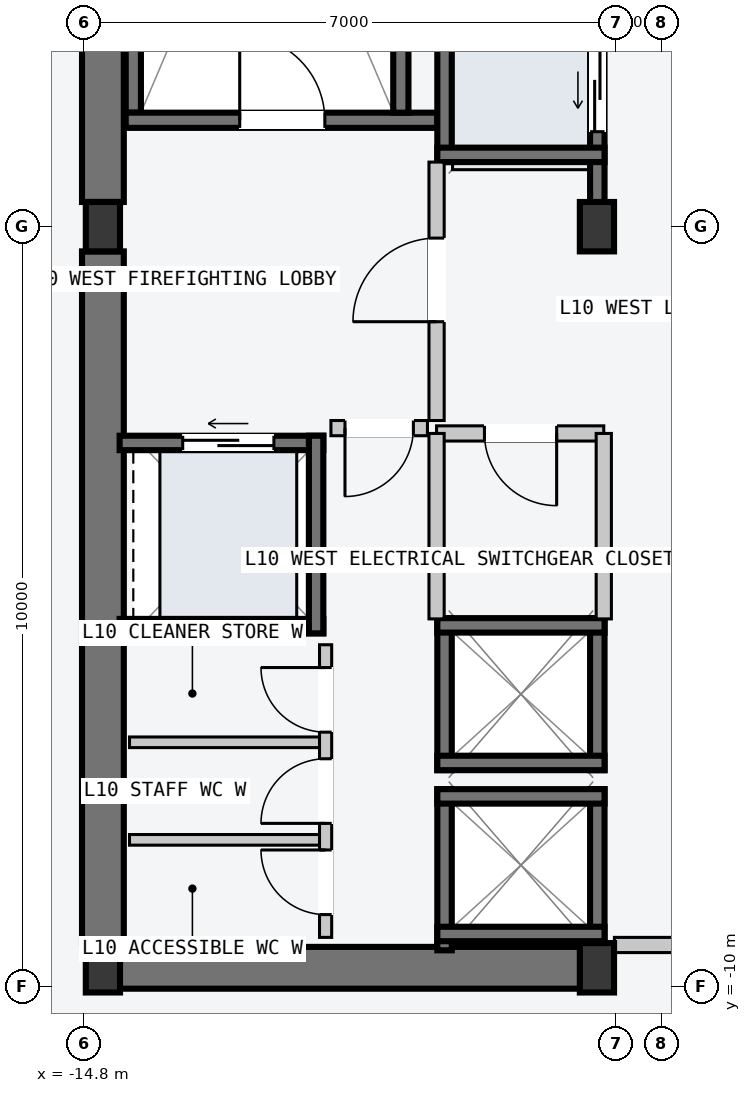
"""IFC4 building model, lengths in metres.
Left out: names, types, materials, properties, quantities, classifications, styles, units other than length and angle.
Written with IfcOpenShell. Run it as: python <this file> out.ifc"""

import sys

from ifc_helpers import new_model, si_unit, direction, frame, frame_2d, origin, origin_2d, place, context, subcontext, project, spatial, rectangle, i_section, extrude, element, fill, save


model = new_model("IFC4")
c1 = context("Model", 3, precision=1e-05, world=origin(), true_north=direction((0.0, 1.0)))
c2 = subcontext(c1, "Body", "Model", "MODEL_VIEW")
j1 = project(units=[si_unit("LENGTHUNIT", "METRE"), si_unit("PLANEANGLEUNIT", "RADIAN")], contexts=[c1])
p1 = place(None, origin())
s1 = spatial("IfcSite", under=j1, at=p1, CompositionType="ELEMENT")
p2 = place(p1, origin())
s2 = spatial("IfcBuilding", under=s1, at=p2, CompositionType="ELEMENT")
p3 = place(p2, frame((0.0, 0.0, 42.0)))
s3 = spatial("IfcBuildingStorey", under=s2, at=p3, CompositionType="ELEMENT", Elevation=42.0)
p4 = place(p3, frame((-14.53, -9.75, -0.2), z_axis=(0.0, 0.0, 1.0), x_axis=(1.0, 0.0, 0.0)))
e1 = element("IfcWall", 1, at=p4, inside=s3, PredefinedType="SHEAR", context=c2, shape_type="SweptSolid", body=[
    extrude(rectangle(XDim=6.46, YDim=0.55, at=frame_2d((3.23, 0.0))), origin(), (0.0, 0.0, 1.0), 3.6),
])
for number, where, z_axis, x_axis in (
    (2, (-14.55, -9.425, -0.2), (0.0, 0.0, 1.0), (0.0, 1.0, 0.0)),
    (3, (-14.55, 0.325, -0.2), (0.0, 0.0, 1.0), (0.0, 1.0, 0.0)),
):
    element("IfcWall", number, at=place(p3, frame(where, z_axis=z_axis, x_axis=x_axis)), inside=s3, PredefinedType="SHEAR", context=c2, shape_type="SweptSolid", body=[
        extrude(rectangle(XDim=9.1, YDim=0.55, at=frame_2d((4.55, 0.0))), origin(), (0.0, 0.0, 1.0), 3.6),
    ])
p5 = place(p3, frame((-14.15, 1.5, -0.2), z_axis=(0.0, 0.0, 1.0), x_axis=(0.0, 1.0, 0.0)))
e4 = element("IfcWall", 4, at=p5, inside=s3, PredefinedType="SOLIDWALL", context=c2, shape_type="SweptSolid", body=[
    extrude(rectangle(XDim=7.8, YDim=0.2, at=frame_2d((3.9, 0.0))), origin(), (0.0, 0.0, 1.0), 3.6),
])
p6 = place(p3, frame((-14.25, 1.4, -0.2), z_axis=(0.0, 0.0, 1.0), x_axis=(1.0, 0.0, 0.0)))
e5 = element("IfcWall", 5, at=p6, inside=s3, PredefinedType="SOLIDWALL", context=c2, shape_type="SweptSolid", body=[
    extrude(rectangle(XDim=4.1, YDim=0.2, at=frame_2d((2.05, 0.0))), origin(), (0.0, 0.0, 1.0), 3.6),
])
p7 = place(p6, frame((1.5, 0.0, 0.2)))
e6 = element("IfcOpeningElement", 6, at=p7, cuts=e5, PredefinedType="OPENING", context=c2, shape_type="SweptSolid", body=[
    extrude(rectangle(XDim=1.12, YDim=2.18, at=frame_2d((0.56, 1.09))), frame((0.0, 0.11, 0.0), z_axis=(0.0, -1.0, 0.0), x_axis=(1.0, 0.0, 0.0)), (0.0, 0.0, 1.0), 0.22),
])
p8 = place(p3, frame((-10.63, 1.5, -0.2), z_axis=(0.0, 0.0, 1.0), x_axis=(0.0, 1.0, 0.0)))
e7 = element("IfcWall", 7, at=p8, inside=s3, PredefinedType="SOLIDWALL", context=c2, shape_type="SweptSolid", body=[
    extrude(rectangle(XDim=7.8, YDim=0.2, at=frame_2d((3.9, 0.0))), origin(), (0.0, 0.0, 1.0), 3.6),
])
for number, where, z_axis, x_axis in (
    (8, (-14.55, -9.75, 0.0), (0.0, 0.0, 1.0), (1.0, 0.0, 0.0)),
    (9, (-14.55, 0.0, 0.0), (0.0, 0.0, 1.0), (1.0, 0.0, 0.0)),
    (10, (-8.05, -9.75, 0.0), (0.0, 0.0, 1.0), (1.0, 0.0, 0.0)),
    (11, (-8.05, 0.0, 0.0), (0.0, 0.0, 1.0), (1.0, 0.0, 0.0)),
):
    element("IfcColumn", number, at=place(p3, frame(where, z_axis=z_axis, x_axis=x_axis)), inside=s3, PredefinedType="COLUMN", context=c2, shape_type="SweptSolid", body=[
        extrude(i_section(OverallWidth=0.45, OverallDepth=0.65, WebThickness=0.025, FlangeThickness=0.04, at=origin_2d()), origin(), (0.0, 0.0, 1.0), 3.6),
    ])
p9 = place(p3, frame((-8.045, 0.21, -0.2), z_axis=(0.0, 0.0, 1.0), x_axis=(0.0, 1.0, 0.0)))
e12 = element("IfcWall", 12, at=p9, inside=s3, PredefinedType="SOLIDWALL", context=c2, shape_type="SweptSolid", body=[
    extrude(rectangle(XDim=2.54, YDim=0.19, at=frame_2d((1.27, 0.0))), origin(), (0.0, 0.0, 1.0), 3.6),
])
p10 = place(p9, frame((1.04, 0.0, 0.2)))
e13 = element("IfcOpeningElement", 13, at=p10, cuts=e12, PredefinedType="OPENING", context=c2, shape_type="SweptSolid", body=[
    extrude(rectangle(XDim=1.1, YDim=2.2, at=frame_2d((0.55, 1.1))), frame((0.0, 0.105, 0.0), z_axis=(0.0, -1.0, 0.0), x_axis=(1.0, 0.0, 0.0)), (0.0, 0.0, 1.0), 0.21),
])
p11 = place(p3, frame((-10.055, 0.85, -0.2), z_axis=(0.0, 0.0, 1.0), x_axis=(0.0, 1.0, 0.0)))
e14 = element("IfcWall", 14, at=p11, inside=s3, PredefinedType="SOLIDWALL", context=c2, shape_type="SweptSolid", body=[
    extrude(rectangle(XDim=1.9, YDim=0.19, at=frame_2d((0.95, 0.0))), origin(), (0.0, 0.0, 1.0), 3.6),
])
p12 = place(p3, frame((-10.15, 0.945, -0.2), z_axis=(0.0, 0.0, 1.0), x_axis=(1.0, 0.0, 0.0)))
e15 = element("IfcWall", 15, at=p12, inside=s3, PredefinedType="SOLIDWALL", context=c2, shape_type="SweptSolid", body=[
    extrude(rectangle(XDim=2.2, YDim=0.19, at=frame_2d((1.1, 0.0))), origin(), (0.0, 0.0, 1.0), 3.6),
])
for number, where, z_axis, x_axis in (
    (16, (-8.045, -9.52, -0.2), (0.0, 0.0, 1.0), (0.0, 1.0, 0.0)),
    (17, (-10.055, -9.52, -0.2), (0.0, 0.0, 1.0), (0.0, 1.0, 0.0)),
):
    element("IfcWall", number, at=place(p3, frame(where, z_axis=z_axis, x_axis=x_axis)), inside=s3, PredefinedType="SOLIDWALL", context=c2, shape_type="SweptSolid", body=[
        extrude(rectangle(XDim=2.12, YDim=0.19, at=frame_2d((1.06, 0.0))), origin(), (0.0, 0.0, 1.0), 3.6),
    ])
for number, where, z_axis, x_axis in (
    (18, (-10.15, -7.495, -0.2), (0.0, 0.0, 1.0), (1.0, 0.0, 0.0)),
    (19, (-10.15, -9.305, -0.2), (0.0, 0.0, 1.0), (1.0, 0.0, 0.0)),
):
    element("IfcWall", number, at=place(p3, frame(where, z_axis=z_axis, x_axis=x_axis)), inside=s3, PredefinedType="SOLIDWALL", context=c2, shape_type="SweptSolid", body=[
        extrude(rectangle(XDim=2.2, YDim=0.19, at=frame_2d((1.1, 0.0))), origin(), (0.0, 0.0, 1.0), 3.6),
    ])
for number, where, z_axis, x_axis in (
    (20, (-8.045, -7.15, -0.2), (0.0, 0.0, 1.0), (0.0, 1.0, 0.0)),
    (21, (-10.055, -7.15, -0.2), (0.0, 0.0, 1.0), (0.0, 1.0, 0.0)),
):
    element("IfcWall", number, at=place(p3, frame(where, z_axis=z_axis, x_axis=x_axis)), inside=s3, PredefinedType="SOLIDWALL", context=c2, shape_type="SweptSolid", body=[
        extrude(rectangle(XDim=2.0, YDim=0.19, at=frame_2d((1.0, 0.0))), origin(), (0.0, 0.0, 1.0), 3.6),
    ])
for number, where, z_axis, x_axis in (
    (22, (-10.15, -5.245, -0.2), (0.0, 0.0, 1.0), (1.0, 0.0, 0.0)),
    (23, (-10.15, -7.055, -0.2), (0.0, 0.0, 1.0), (1.0, 0.0, 0.0)),
):
    element("IfcWall", number, at=place(p3, frame(where, z_axis=z_axis, x_axis=x_axis)), inside=s3, PredefinedType="SOLIDWALL", context=c2, shape_type="SweptSolid", body=[
        extrude(rectangle(XDim=2.2, YDim=0.19, at=frame_2d((1.1, 0.0))), origin(), (0.0, 0.0, 1.0), 3.6),
    ])
p13 = place(p3, frame((-14.33, -2.845, -0.2), z_axis=(0.0, 0.0, 1.0), x_axis=(1.0, 0.0, 0.0)))
e24 = element("IfcWall", 24, at=p13, inside=s3, PredefinedType="SOLIDWALL", context=c2, shape_type="SweptSolid", body=[
    extrude(rectangle(XDim=2.68, YDim=0.19, at=frame_2d((1.34, 0.0))), origin(), (0.0, 0.0, 1.0), 3.6),
])
p14 = place(p13, frame((0.83, 0.0, 0.2)))
e25 = element("IfcOpeningElement", 25, at=p14, cuts=e24, PredefinedType="OPENING", context=c2, shape_type="SweptSolid", body=[
    extrude(rectangle(XDim=1.2, YDim=2.2, at=frame_2d((0.6, 1.1))), frame((0.0, 0.105, 0.0), z_axis=(0.0, -1.0, 0.0), x_axis=(1.0, 0.0, 0.0)), (0.0, 0.0, 1.0), 0.21),
])
p15 = place(p3, frame((-14.33, -5.255, -0.2), z_axis=(0.0, 0.0, 1.0), x_axis=(1.0, 0.0, 0.0)))
e26 = element("IfcWall", 26, at=p15, inside=s3, PredefinedType="SOLIDWALL", context=c2, shape_type="SweptSolid", body=[
    extrude(rectangle(XDim=2.68, YDim=0.19, at=frame_2d((1.34, 0.0))), origin(), (0.0, 0.0, 1.0), 3.6),
])
p16 = place(p3, frame((-11.745, -5.35, -0.2), z_axis=(0.0, 0.0, 1.0), x_axis=(0.0, 1.0, 0.0)))
e27 = element("IfcWall", 27, at=p16, inside=s3, PredefinedType="SOLIDWALL", context=c2, shape_type="SweptSolid", body=[
    extrude(rectangle(XDim=2.6, YDim=0.19, at=frame_2d((1.3, 0.0))), origin(), (0.0, 0.0, 1.0), 3.6),
])
p17 = place(p3, frame((-6.02, -9.45, 0.0), z_axis=(0.0, 0.0, 1.0), x_axis=(-1.0, 0.0, 0.0)))
e28 = element("IfcWall", 28, at=p17, inside=s3, PredefinedType="PARTITIONING", context=c2, shape_type="SweptSolid", body=[
    extrude(rectangle(XDim=1.8, YDim=0.2, at=frame_2d((0.9, 0.0))), origin(), (0.0, 0.0, 1.0), 3.4),
])
p18 = place(p3, frame((-10.16, -2.55, 0.0), z_axis=(0.0, 0.0, 1.0), x_axis=(0.0, 1.0, 0.0)))
e29 = element("IfcWall", 29, at=p18, inside=s3, PredefinedType="PARTITIONING", context=c2, shape_type="SweptSolid", body=[
    extrude(rectangle(XDim=3.4, YDim=0.2, at=frame_2d((1.7, 0.0))), origin(), (0.0, 0.0, 1.0), 3.4),
])
p19 = place(p18, frame((1.3, 0.0, 0.0)))
e30 = element("IfcOpeningElement", 30, at=p19, cuts=e29, PredefinedType="OPENING", context=c2, shape_type="SweptSolid", body=[
    extrude(rectangle(XDim=1.1, YDim=2.15, at=frame_2d((0.55, 1.075))), frame((0.0, 0.11, 0.0), z_axis=(0.0, -1.0, 0.0), x_axis=(1.0, 0.0, 0.0)), (0.0, 0.0, 1.0), 0.22),
])
p20 = place(p3, frame((-10.28, -2.65, 0.0), z_axis=(0.0, 0.0, 1.0), x_axis=(-1.0, 0.0, 0.0)))
e31 = element("IfcWall", 31, at=p20, inside=s3, PredefinedType="PARTITIONING", context=c2, shape_type="SweptSolid", body=[
    extrude(rectangle(XDim=1.27, YDim=0.2, at=frame_2d((0.635, 0.0))), origin(), (0.0, 0.0, 1.0), 3.4),
])
p21 = place(p20, frame((0.185, 0.0, 0.0)))
e32 = element("IfcOpeningElement", 32, at=p21, cuts=e31, PredefinedType="OPENING", context=c2, shape_type="SweptSolid", body=[
    extrude(rectangle(XDim=0.9, YDim=2.15, at=frame_2d((0.45, 1.075))), frame((0.0, 0.11, 0.0), z_axis=(0.0, -1.0, 0.0), x_axis=(1.0, 0.0, 0.0)), (0.0, 0.0, 1.0), 0.22),
])
p22 = place(p3, frame((-7.96, -2.72, 0.0), z_axis=(0.0, 0.0, 1.0), x_axis=(-1.0, 0.0, 0.0)))
e33 = element("IfcWall", 33, at=p22, inside=s3, PredefinedType="PARTITIONING", context=c2, shape_type="SweptSolid", body=[
    extrude(rectangle(XDim=2.2, YDim=0.2, at=frame_2d((1.1, 0.0))), origin(), (0.0, 0.0, 1.0), 3.4),
])
p23 = place(p22, frame((0.62, 0.0, 0.0)))
e34 = element("IfcOpeningElement", 34, at=p23, cuts=e33, PredefinedType="OPENING", context=c2, shape_type="SweptSolid", body=[
    extrude(rectangle(XDim=0.95, YDim=2.1, at=frame_2d((0.475, 1.05))), frame((0.0, 0.11, 0.0), z_axis=(0.0, -1.0, 0.0), x_axis=(1.0, 0.0, 0.0)), (0.0, 0.0, 1.0), 0.22),
])
for number, where, z_axis, x_axis in (
    (35, (-7.96, -5.16, 0.0), (0.0, 0.0, 1.0), (0.0, 1.0, 0.0)),
    (36, (-10.16, -5.16, 0.0), (0.0, 0.0, 1.0), (0.0, 1.0, 0.0)),
):
    element("IfcWall", number, at=place(p3, frame(where, z_axis=z_axis, x_axis=x_axis)), inside=s3, PredefinedType="PARTITIONING", context=c2, shape_type="SweptSolid", body=[
        extrude(rectangle(XDim=2.44, YDim=0.2, at=frame_2d((1.22, 0.0))), origin(), (0.0, 0.0, 1.0), 3.4),
    ])
for number, where, z_axis, x_axis in (
    (37, (-11.7, -8.067, 0.0), (0.0, 0.0, 1.0), (-1.0, 0.0, 0.0)),
    (38, (-11.7, -6.783, 0.0), (0.0, 0.0, 1.0), (-1.0, 0.0, 0.0)),
):
    element("IfcWall", number, at=place(p3, frame(where, z_axis=z_axis, x_axis=x_axis)), inside=s3, PredefinedType="PARTITIONING", context=c2, shape_type="SweptSolid", body=[
        extrude(rectangle(XDim=2.5, YDim=0.14, at=frame_2d((1.25, 0.0))), origin(), (0.0, 0.0, 1.0), 3.4),
    ])
p24 = place(p3, frame((-11.62, -9.35, 0.0), z_axis=(0.0, 0.0, 1.0), x_axis=(0.0, 1.0, 0.0)))
e39 = element("IfcWall", 39, at=p24, inside=s3, PredefinedType="PARTITIONING", context=c2, shape_type="SweptSolid", body=[
    extrude(rectangle(XDim=3.85, YDim=0.16, at=frame_2d((1.925, 0.0))), origin(), (0.0, 0.0, 1.0), 3.4),
])
p25 = place(p24, frame((0.3, 0.0, 0.0)))
e40 = element("IfcOpeningElement", 40, at=p25, cuts=e39, PredefinedType="OPENING", context=c2, shape_type="SweptSolid", body=[
    extrude(rectangle(XDim=0.85, YDim=2.12, at=frame_2d((0.425, 1.06))), frame((0.0, 0.09, 0.0), z_axis=(0.0, -1.0, 0.0), x_axis=(1.0, 0.0, 0.0)), (0.0, 0.0, 1.0), 0.18),
])
p26 = place(p24, frame((1.5, 0.0, 0.0)))
e41 = element("IfcOpeningElement", 41, at=p26, cuts=e39, PredefinedType="OPENING", context=c2, shape_type="SweptSolid", body=[
    extrude(rectangle(XDim=0.85, YDim=2.12, at=frame_2d((0.425, 1.06))), frame((0.0, 0.09, 0.0), z_axis=(0.0, -1.0, 0.0), x_axis=(1.0, 0.0, 0.0)), (0.0, 0.0, 1.0), 0.18),
])
p27 = place(p24, frame((2.7, 0.0, 0.0)))
e42 = element("IfcOpeningElement", 42, at=p27, cuts=e39, PredefinedType="OPENING", context=c2, shape_type="SweptSolid", body=[
    extrude(rectangle(XDim=0.85, YDim=2.12, at=frame_2d((0.425, 1.06))), frame((0.0, 0.09, 0.0), z_axis=(0.0, -1.0, 0.0), x_axis=(1.0, 0.0, 0.0)), (0.0, 0.0, 1.0), 0.18),
])
p28 = place(p7, origin())
e43 = element("IfcDoor", 43, at=p28, inside=s3, OperationType="SINGLE_SWING_LEFT", PredefinedType="DOOR", context=c2, shape_type="SweptSolid", body=[
    extrude(rectangle(XDim=1.12, YDim=2.18, at=frame_2d((0.56, 1.09))), frame((0.0, 0.025, 0.0), z_axis=(0.0, -1.0, 0.0), x_axis=(1.0, 0.0, 0.0)), (0.0, 0.0, 1.0), 0.05),
])
fill(e6, e43)
p29 = place(p10, origin())
e44 = element("IfcDoor", 44, at=p29, inside=s3, OperationType="SLIDING_TO_LEFT", PredefinedType="DOOR", context=c2, shape_type="SweptSolid", body=[
    extrude(rectangle(XDim=1.1, YDim=2.2, at=frame_2d((0.55, 1.1))), frame((0.0, 0.025, 0.0), z_axis=(0.0, -1.0, 0.0), x_axis=(1.0, 0.0, 0.0)), (0.0, 0.0, 1.0), 0.05),
])
fill(e13, e44)
p30 = place(p14, origin())
e45 = element("IfcDoor", 45, at=p30, inside=s3, OperationType="SLIDING_TO_LEFT", PredefinedType="DOOR", context=c2, shape_type="SweptSolid", body=[
    extrude(rectangle(XDim=1.2, YDim=2.2, at=frame_2d((0.6, 1.1))), frame((0.0, 0.025, 0.0), z_axis=(0.0, -1.0, 0.0), x_axis=(1.0, 0.0, 0.0)), (0.0, 0.0, 1.0), 0.05),
])
fill(e25, e45)
p31 = place(p19, origin())
e46 = element("IfcDoor", 46, at=p31, inside=s3, OperationType="SINGLE_SWING_LEFT", PredefinedType="DOOR", context=c2, shape_type="SweptSolid", body=[
    extrude(rectangle(XDim=1.1, YDim=2.15, at=frame_2d((0.55, 1.075))), frame((0.0, 0.025, 0.0), z_axis=(0.0, -1.0, 0.0), x_axis=(1.0, 0.0, 0.0)), (0.0, 0.0, 1.0), 0.05),
])
fill(e30, e46)
p32 = place(p21, origin())
e47 = element("IfcDoor", 47, at=p32, inside=s3, OperationType="SINGLE_SWING_RIGHT", PredefinedType="DOOR", context=c2, shape_type="SweptSolid", body=[
    extrude(rectangle(XDim=0.9, YDim=2.15, at=frame_2d((0.45, 1.075))), frame((0.0, 0.025, 0.0), z_axis=(0.0, -1.0, 0.0), x_axis=(1.0, 0.0, 0.0)), (0.0, 0.0, 1.0), 0.05),
])
fill(e32, e47)
p33 = place(p23, origin())
e48 = element("IfcDoor", 48, at=p33, inside=s3, OperationType="SINGLE_SWING_LEFT", PredefinedType="DOOR", context=c2, shape_type="SweptSolid", body=[
    extrude(rectangle(XDim=0.95, YDim=2.1, at=frame_2d((0.475, 1.05))), frame((0.0, 0.025, 0.0), z_axis=(0.0, -1.0, 0.0), x_axis=(1.0, 0.0, 0.0)), (0.0, 0.0, 1.0), 0.05),
])
fill(e34, e48)
p34 = place(p25, origin())
e49 = element("IfcDoor", 49, at=p34, inside=s3, OperationType="SINGLE_SWING_RIGHT", PredefinedType="DOOR", context=c2, shape_type="SweptSolid", body=[
    extrude(rectangle(XDim=0.85, YDim=2.12, at=frame_2d((0.425, 1.06))), frame((0.0, 0.025, 0.0), z_axis=(0.0, -1.0, 0.0), x_axis=(1.0, 0.0, 0.0)), (0.0, 0.0, 1.0), 0.05),
])
fill(e40, e49)
p35 = place(p26, origin())
e50 = element("IfcDoor", 50, at=p35, inside=s3, OperationType="SINGLE_SWING_LEFT", PredefinedType="DOOR", context=c2, shape_type="SweptSolid", body=[
    extrude(rectangle(XDim=0.85, YDim=2.12, at=frame_2d((0.425, 1.06))), frame((0.0, 0.025, 0.0), z_axis=(0.0, -1.0, 0.0), x_axis=(1.0, 0.0, 0.0)), (0.0, 0.0, 1.0), 0.05),
])
fill(e41, e50)
p36 = place(p27, origin())
e51 = element("IfcDoor", 51, at=p36, inside=s3, OperationType="SINGLE_SWING_RIGHT", PredefinedType="DOOR", context=c2, shape_type="SweptSolid", body=[
    extrude(rectangle(XDim=0.85, YDim=2.12, at=frame_2d((0.425, 1.06))), frame((0.0, 0.025, 0.0), z_axis=(0.0, -1.0, 0.0), x_axis=(1.0, 0.0, 0.0)), (0.0, 0.0, 1.0), 0.05),
])
fill(e42, e51)
save(model, sys.argv[1])
